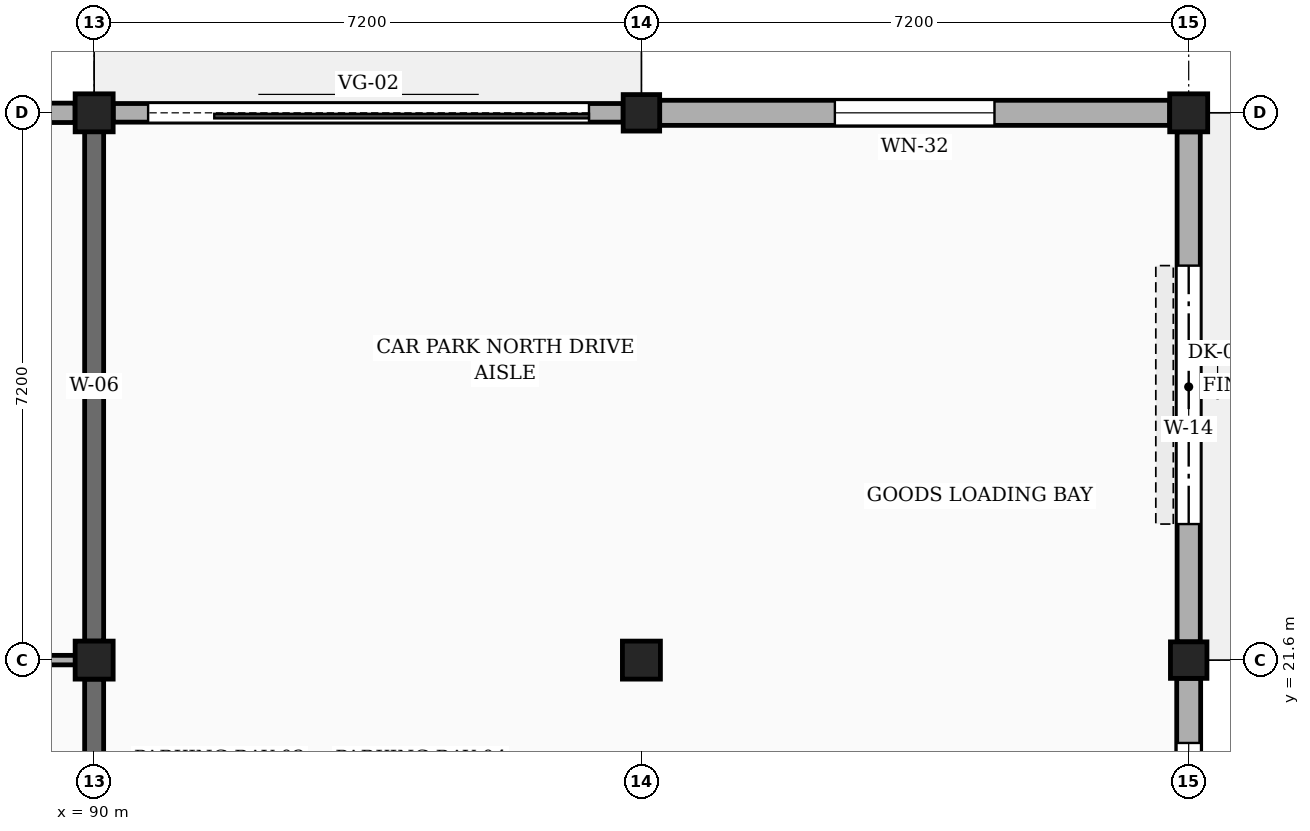
"""IFC4 building model, lengths in metres.
Left out: names, types, materials, properties, quantities, classifications, styles, units other than length and angle.
Written with IfcOpenShell. Run it as: python <this file> out.ifc"""

import sys

from ifc_helpers import new_model, si_unit, direction, frame, frame_2d, origin, origin_2d, place, context, subcontext, project, spatial, rectangle, extrude, element, fill, save


model = new_model("IFC4")
c1 = context("Model", 3, precision=1e-05, world=origin(), true_north=direction((0.0, 1.0)))
c2 = subcontext(c1, "Body", "Model", "MODEL_VIEW")
j1 = project(units=[si_unit("LENGTHUNIT", "METRE"), si_unit("PLANEANGLEUNIT", "RADIAN")], contexts=[c1])
p1 = place(None, origin())
s1 = spatial("IfcSite", under=j1, at=p1, CompositionType="ELEMENT")
p2 = place(p1, origin())
s2 = spatial("IfcBuilding", under=s1, at=p2, CompositionType="ELEMENT")
p3 = place(p2, origin())
s3 = spatial("IfcBuildingStorey", under=s2, at=p3, CompositionType="ELEMENT", Elevation=0.0)
for number, where, z_axis, x_axis in (
    (1, (90.0, 21.6, 0.0), (0.0, 0.0, 1.0), (1.0, 0.0, 0.0)),
    (2, (90.0, 28.8, 0.0), (0.0, 0.0, 1.0), (1.0, 0.0, 0.0)),
):
    element("IfcColumn", number, at=place(p3, frame(where, z_axis=z_axis, x_axis=x_axis)), inside=s3, PredefinedType="COLUMN", context=c2, shape_type="SweptSolid", body=[
        extrude(rectangle(XDim=0.5, YDim=0.5, at=origin_2d()), origin(), (0.0, 0.0, 1.0), 4.5),
    ])
p4 = place(p3, frame((97.2, 21.6, 0.0), z_axis=(0.0, 0.0, 1.0), x_axis=(1.0, 0.0, 0.0)))
e3 = element("IfcColumn", 3, at=p4, inside=s3, PredefinedType="COLUMN", context=c2, shape_type="SweptSolid", body=[
    extrude(rectangle(XDim=0.5, YDim=0.5, at=origin_2d()), origin(), (0.0, 0.0, 1.0), 6.067),
])
p5 = place(p3, frame((97.2, 28.8, 0.0), z_axis=(0.0, 0.0, 1.0), x_axis=(1.0, 0.0, 0.0)))
e4 = element("IfcColumn", 4, at=p5, inside=s3, PredefinedType="PILASTER", context=c2, shape_type="SweptSolid", body=[
    extrude(rectangle(XDim=0.48, YDim=0.48, at=origin_2d()), origin(), (0.0, 0.0, 1.0), 4.5),
])
p6 = place(p3, frame((104.4, 21.6, 0.0), z_axis=(0.0, 0.0, 1.0), x_axis=(1.0, 0.0, 0.0)))
e5 = element("IfcColumn", 5, at=p6, inside=s3, PredefinedType="PILASTER", context=c2, shape_type="SweptSolid", body=[
    extrude(rectangle(XDim=0.48, YDim=0.48, at=origin_2d()), origin(), (0.0, 0.0, 1.0), 6.067),
])
p7 = place(p3, frame((104.4, 28.8, 0.0), z_axis=(0.0, 0.0, 1.0), x_axis=(1.0, 0.0, 0.0)))
e6 = element("IfcColumn", 6, at=p7, inside=s3, PredefinedType="COLUMN", context=c2, shape_type="SweptSolid", body=[
    extrude(rectangle(XDim=0.5, YDim=0.5, at=origin_2d()), origin(), (0.0, 0.0, 1.0), 4.5),
])
p8 = place(p3, frame((104.4, 14.65, 0.0), z_axis=(0.0, 0.0, 1.0), x_axis=(0.0, 1.0, 0.0)))
e7 = element("IfcWall", 7, at=p8, inside=s3, PredefinedType="SOLIDWALL", context=c2, shape_type="SweptSolid", body=[
    extrude(rectangle(XDim=6.71, YDim=0.315, at=frame_2d((3.355, 0.0))), origin(), (0.0, 0.0, 1.0), 3.83),
])
p9 = place(p8, frame((4.06, 0.0, 0.85)))
e8 = element("IfcOpeningElement", 8, at=p9, cuts=e7, PredefinedType="OPENING", context=c2, shape_type="SweptSolid", body=[
    extrude(rectangle(XDim=1.8, YDim=2.1, at=frame_2d((0.9, 1.05))), frame((0.0, 0.167, 0.0), z_axis=(0.0, -1.0, 0.0), x_axis=(1.0, 0.0, 0.0)), (0.0, 0.0, 1.0), 0.335),
])
p10 = place(p3, frame((104.4, 21.84, 0.0), z_axis=(0.0, 0.0, 1.0), x_axis=(0.0, 1.0, 0.0)))
e9 = element("IfcWall", 9, at=p10, inside=s3, PredefinedType="SOLIDWALL", context=c2, shape_type="SweptSolid", body=[
    extrude(rectangle(XDim=6.71, YDim=0.305, at=frame_2d((3.355, 0.0))), origin(), (0.0, 0.0, 1.0), 3.83),
])
p11 = place(p10, frame((1.55, 0.0, 0.0)))
e10 = element("IfcOpeningElement", 10, at=p11, cuts=e9, PredefinedType="OPENING", context=c2, shape_type="SweptSolid", body=[
    extrude(rectangle(XDim=3.4, YDim=3.1, at=frame_2d((1.7, 1.55))), frame((0.0, 0.163, 0.0), z_axis=(0.0, -1.0, 0.0), x_axis=(1.0, 0.0, 0.0)), (0.0, 0.0, 1.0), 0.325),
])
p12 = place(p3, frame((104.15, 28.8, 0.0), z_axis=(0.0, 0.0, 1.0), x_axis=(-1.0, 0.0, 0.0)))
e11 = element("IfcWall", 11, at=p12, inside=s3, PredefinedType="SOLIDWALL", context=c2, shape_type="SweptSolid", body=[
    extrude(rectangle(XDim=6.71, YDim=0.33, at=frame_2d((3.355, 0.0))), origin(), (0.0, 0.0, 1.0), 3.83),
])
p13 = place(p12, frame((2.305, 0.0, 0.85)))
e12 = element("IfcOpeningElement", 12, at=p13, cuts=e11, PredefinedType="OPENING", context=c2, shape_type="SweptSolid", body=[
    extrude(rectangle(XDim=2.1, YDim=2.1, at=frame_2d((1.05, 1.05))), frame((0.0, 0.175, 0.0), z_axis=(0.0, -1.0, 0.0), x_axis=(1.0, 0.0, 0.0)), (0.0, 0.0, 1.0), 0.35),
])
p14 = place(p3, frame((96.96, 28.8, 0.0), z_axis=(0.0, 0.0, 1.0), x_axis=(-1.0, 0.0, 0.0)))
e13 = element("IfcWall", 13, at=p14, inside=s3, PredefinedType="SOLIDWALL", context=c2, shape_type="SweptSolid", body=[
    extrude(rectangle(XDim=6.71, YDim=0.245, at=frame_2d((3.355, 0.0))), origin(), (0.0, 0.0, 1.0), 3.83),
])
p15 = place(p14, frame((0.45, 0.0, 0.0)))
e14 = element("IfcOpeningElement", 14, at=p15, cuts=e13, PredefinedType="OPENING", context=c2, shape_type="SweptSolid", body=[
    extrude(rectangle(XDim=5.8, YDim=3.1, at=frame_2d((2.9, 1.55))), frame((0.0, 0.133, 0.0), z_axis=(0.0, -1.0, 0.0), x_axis=(1.0, 0.0, 0.0)), (0.0, 0.0, 1.0), 0.265),
])
p16 = place(p3, frame((89.75, 28.8, 0.0), z_axis=(0.0, 0.0, 1.0), x_axis=(-1.0, 0.0, 0.0)))
e15 = element("IfcWall", 15, at=p16, inside=s3, PredefinedType="SOLIDWALL", context=c2, shape_type="SweptSolid", body=[
    extrude(rectangle(XDim=6.7, YDim=0.255, at=frame_2d((3.35, 0.0))), origin(), (0.0, 0.0, 1.0), 3.83),
])
p17 = place(p16, frame((2.45, 0.0, 0.85)))
e16 = element("IfcOpeningElement", 16, at=p17, cuts=e15, PredefinedType="OPENING", context=c2, shape_type="SweptSolid", body=[
    extrude(rectangle(XDim=1.8, YDim=2.1, at=frame_2d((0.9, 1.05))), frame((0.0, 0.137, 0.0), z_axis=(0.0, -1.0, 0.0), x_axis=(1.0, 0.0, 0.0)), (0.0, 0.0, 1.0), 0.275),
])
p18 = place(p3, frame((83.08, 21.6, 0.0), z_axis=(0.0, 0.0, 1.0), x_axis=(1.0, 0.0, 0.0)))
e17 = element("IfcWall", 17, at=p18, inside=s3, PredefinedType="PARTITIONING", context=c2, shape_type="SweptSolid", body=[
    extrude(rectangle(XDim=6.77, YDim=0.125, at=frame_2d((3.385, 0.0))), origin(), (0.0, 0.0, 1.0), 3.41),
])
p19 = place(p3, frame((90.0, 14.65, 0.0), z_axis=(0.0, 0.0, 1.0), x_axis=(0.0, 1.0, 0.0)))
e18 = element("IfcWall", 18, at=p19, inside=s3, PredefinedType="SHEAR", context=c2, shape_type="SweptSolid", body=[
    extrude(rectangle(XDim=6.7, YDim=0.25, at=frame_2d((3.35, 0.0))), origin(), (0.0, 0.0, 1.0), 3.85),
])
p20 = place(p3, frame((90.0, 21.85, 0.0), z_axis=(0.0, 0.0, 1.0), x_axis=(0.0, 1.0, 0.0)))
e19 = element("IfcWall", 19, at=p20, inside=s3, PredefinedType="SHEAR", context=c2, shape_type="SweptSolid", body=[
    extrude(rectangle(XDim=6.71, YDim=0.25, at=frame_2d((3.355, 0.0))), origin(), (0.0, 0.0, 1.0), 3.85),
])
p21 = place(p9, origin())
e20 = element("IfcWindow", 20, at=p21, inside=s3, PartitioningType="SINGLE_PANEL", PredefinedType="WINDOW", context=c2, shape_type="SweptSolid", body=[
    extrude(rectangle(XDim=1.8, YDim=2.1, at=frame_2d((0.9, 1.05))), frame((0.0, 0.03, 0.0), z_axis=(0.0, -1.0, 0.0), x_axis=(1.0, 0.0, 0.0)), (0.0, 0.0, 1.0), 0.06),
])
fill(e8, e20)
p22 = place(p11, frame((3.4, 0.0, 0.0), z_axis=(0.0, 0.0, 1.0), x_axis=(-1.0, 0.0, 0.0)))
e21 = element("IfcDoor", 21, at=p22, inside=s3, OperationType="ROLLINGUP", PredefinedType="DOOR", context=c2, shape_type="SweptSolid", body=[
    extrude(rectangle(XDim=3.4, YDim=3.1, at=frame_2d((1.7, 1.55))), frame((0.0, 0.025, 0.0), z_axis=(0.0, -1.0, 0.0), x_axis=(1.0, 0.0, 0.0)), (0.0, 0.0, 1.0), 0.05),
])
fill(e10, e21)
p23 = place(p13, origin())
e22 = element("IfcWindow", 22, at=p23, inside=s3, PartitioningType="SINGLE_PANEL", PredefinedType="WINDOW", context=c2, shape_type="SweptSolid", body=[
    extrude(rectangle(XDim=2.1, YDim=2.1, at=frame_2d((1.05, 1.05))), frame((0.0, 0.03, 0.0), z_axis=(0.0, -1.0, 0.0), x_axis=(1.0, 0.0, 0.0)), (0.0, 0.0, 1.0), 0.06),
])
fill(e12, e22)
p24 = place(p15, frame((5.8, 0.0, 0.0), z_axis=(0.0, 0.0, 1.0), x_axis=(-1.0, 0.0, 0.0)))
e23 = element("IfcDoor", 23, at=p24, inside=s3, OperationType="SLIDING_TO_LEFT", PredefinedType="GATE", context=c2, shape_type="SweptSolid", body=[
    extrude(rectangle(XDim=5.8, YDim=3.1, at=frame_2d((2.9, 1.55))), frame((0.0, 0.025, 0.0), z_axis=(0.0, -1.0, 0.0), x_axis=(1.0, 0.0, 0.0)), (0.0, 0.0, 1.0), 0.05),
])
fill(e14, e23)
save(model, sys.argv[1])
